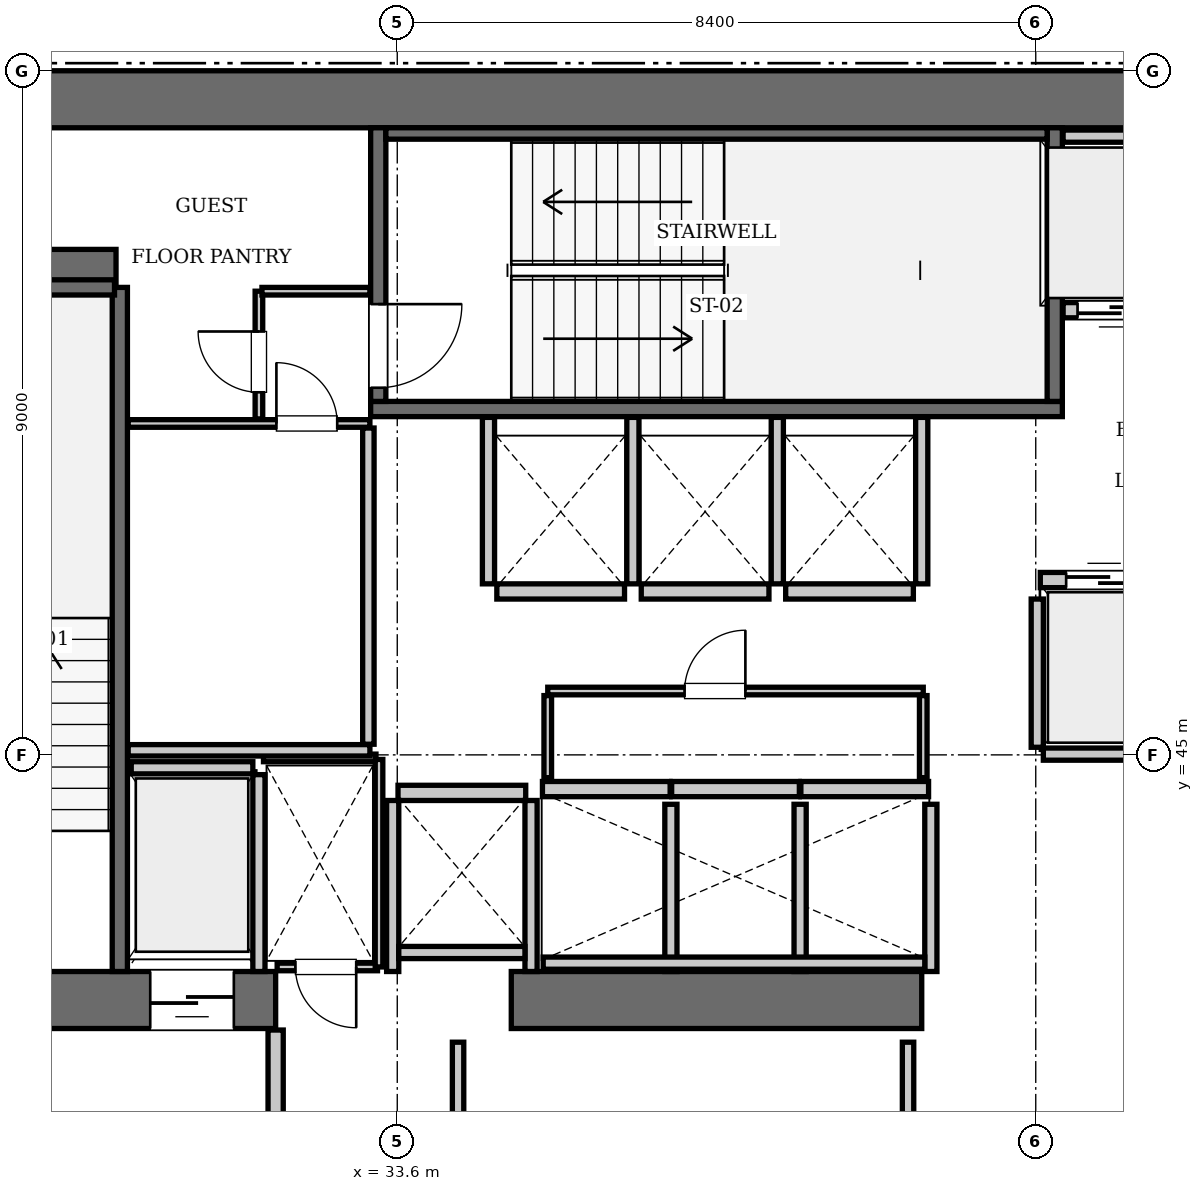
"""IFC4 building model, lengths in metres.
Left out: names, types, materials, properties, quantities, classifications, styles, units other than length and angle.
Written with IfcOpenShell. Run it as: python <this file> out.ifc"""

import sys

from ifc_helpers import new_model, si_unit, direction, frame, frame_2d, origin, place, context, subcontext, project, spatial, rectangle, extrude, element, fill, save


model = new_model("IFC4")
c1 = context("Model", 3, precision=1e-05, world=origin(), true_north=direction((0.0, 1.0)))
c2 = subcontext(c1, "Body", "Model", "MODEL_VIEW")
j1 = project(units=[si_unit("LENGTHUNIT", "METRE"), si_unit("PLANEANGLEUNIT", "RADIAN")], contexts=[c1])
p1 = place(None, origin())
s1 = spatial("IfcSite", under=j1, at=p1, CompositionType="ELEMENT")
p2 = place(p1, origin())
s2 = spatial("IfcBuilding", under=s1, at=p2, CompositionType="ELEMENT")
p3 = place(p2, frame((0.0, 0.0, 162.05)))
s3 = spatial("IfcBuildingStorey", under=s2, at=p3, CompositionType="ELEMENT", Elevation=162.05)
p4 = place(p3, frame((25.2, 53.625, 0.0), z_axis=(0.0, 0.0, 1.0), x_axis=(1.0, 0.0, 0.0)))
e1 = element("IfcWall", 1, at=p4, inside=s3, PredefinedType="SHEAR", context=c2, shape_type="SweptSolid", body=[
    extrude(rectangle(XDim=25.2, YDim=0.75, at=frame_2d((12.6, 0.0))), origin(), (0.0, 0.0, 1.0), 3.85),
])
p5 = place(p3, frame((25.2, 41.775, 0.0), z_axis=(0.0, 0.0, 1.0), x_axis=(1.0, 0.0, 0.0)))
e2 = element("IfcWall", 2, at=p5, inside=s3, PredefinedType="SHEAR", context=c2, shape_type="SweptSolid", body=[
    extrude(rectangle(XDim=6.8, YDim=0.75, at=frame_2d((3.4, 0.0))), origin(), (0.0, 0.0, 1.0), 3.85),
])
p6 = place(p5, frame((1.65, 0.0, 0.0)))
e3 = element("IfcOpeningElement", 3, at=p6, cuts=e2, PredefinedType="OPENING", context=c2, shape_type="SweptSolid", body=[
    extrude(rectangle(XDim=1.15, YDim=2.15, at=frame_2d((0.575, 1.075))), frame((0.0, 0.385, 0.0), z_axis=(0.0, -1.0, 0.0), x_axis=(1.0, 0.0, 0.0)), (0.0, 0.0, 1.0), 0.77),
])
p7 = place(p5, frame((5.15, 0.0, 0.0)))
e4 = element("IfcOpeningElement", 4, at=p7, cuts=e2, PredefinedType="OPENING", context=c2, shape_type="SweptSolid", body=[
    extrude(rectangle(XDim=1.1, YDim=2.2, at=frame_2d((0.55, 1.1))), frame((0.0, 0.385, 0.0), z_axis=(0.0, -1.0, 0.0), x_axis=(1.0, 0.0, 0.0)), (0.0, 0.0, 1.0), 0.77),
])
p8 = place(p3, frame((35.1, 41.775, 0.0), z_axis=(0.0, 0.0, 1.0), x_axis=(1.0, 0.0, 0.0)))
e5 = element("IfcWall", 5, at=p8, inside=s3, PredefinedType="SHEAR", context=c2, shape_type="SweptSolid", body=[
    extrude(rectangle(XDim=5.4, YDim=0.75, at=frame_2d((2.7, 0.0))), origin(), (0.0, 0.0, 1.0), 3.85),
])
p9 = place(p3, frame((25.95, 51.4, 0.0), z_axis=(0.0, 0.0, 1.0), x_axis=(1.0, 0.0, 0.0)))
e6 = element("IfcWall", 6, at=p9, inside=s3, PredefinedType="SHEAR", context=c2, shape_type="SweptSolid", body=[
    extrude(rectangle(XDim=3.95, YDim=0.5, at=frame_2d((1.975, 0.0))), origin(), (0.0, 0.0, 1.0), 3.85),
])
p10 = place(p3, frame((29.95, 42.15, 0.0), z_axis=(0.0, 0.0, 1.0), x_axis=(0.0, 1.0, 0.0)))
e7 = element("IfcWall", 7, at=p10, inside=s3, PredefinedType="SOLIDWALL", context=c2, shape_type="SweptSolid", body=[
    extrude(rectangle(XDim=9.0, YDim=0.2, at=frame_2d((4.5, 0.0))), origin(), (0.0, 0.0, 1.0), 3.61),
])
p11 = place(p3, frame((26.38, 51.15, 0.0), z_axis=(0.0, 0.0, 1.0), x_axis=(1.0, 0.0, 0.0)))
e8 = element("IfcWall", 8, at=p11, inside=s3, PredefinedType="SOLIDWALL", context=c2, shape_type="SweptSolid", body=[
    extrude(rectangle(XDim=3.5, YDim=0.2, at=frame_2d((1.75, 0.0))), origin(), (0.0, 0.0, 1.0), 3.61),
])
p12 = place(p3, frame((33.25, 49.55, 0.0), z_axis=(0.0, 0.0, 1.0), x_axis=(1.0, 0.0, 0.0)))
e9 = element("IfcWall", 9, at=p12, inside=s3, PredefinedType="SOLIDWALL", context=c2, shape_type="SweptSolid", body=[
    extrude(rectangle(XDim=9.1, YDim=0.2, at=frame_2d((4.55, 0.0))), origin(), (0.0, 0.0, 1.0), 3.61),
])
p13 = place(p3, frame((42.25, 49.65, 0.0), z_axis=(0.0, 0.0, 1.0), x_axis=(0.0, 1.0, 0.0)))
e10 = element("IfcWall", 10, at=p13, inside=s3, PredefinedType="SOLIDWALL", context=c2, shape_type="SweptSolid", body=[
    extrude(rectangle(XDim=3.6, YDim=0.2, at=frame_2d((1.8, 0.0))), origin(), (0.0, 0.0, 1.0), 3.61),
])
p14 = place(p3, frame((33.35, 49.65, 0.0), z_axis=(0.0, 0.0, 1.0), x_axis=(0.0, 1.0, 0.0)))
e11 = element("IfcWall", 11, at=p14, inside=s3, PredefinedType="SOLIDWALL", context=c2, shape_type="SweptSolid", body=[
    extrude(rectangle(XDim=3.6, YDim=0.2, at=frame_2d((1.8, 0.0))), origin(), (0.0, 0.0, 1.0), 3.61),
])
p15 = place(p14, frame((0.18, 0.0, 0.0)))
e12 = element("IfcOpeningElement", 12, at=p15, cuts=e11, PredefinedType="OPENING", context=c2, shape_type="SweptSolid", body=[
    extrude(rectangle(XDim=1.1, YDim=2.15, at=frame_2d((0.55, 1.075))), frame((0.0, 0.11, 0.0), z_axis=(0.0, -1.0, 0.0), x_axis=(1.0, 0.0, 0.0)), (0.0, 0.0, 1.0), 0.22),
])
p16 = place(p3, frame((33.45, 53.175, 0.0), z_axis=(0.0, 0.0, 1.0), x_axis=(1.0, 0.0, 0.0)))
e13 = element("IfcWall", 13, at=p16, inside=s3, PredefinedType="SOLIDWALL", context=c2, shape_type="SweptSolid", body=[
    extrude(rectangle(XDim=8.7, YDim=0.15, at=frame_2d((4.35, 0.0))), origin(), (0.0, 0.0, 1.0), 3.61),
])
p17 = place(p3, frame((42.06, 47.3, 0.0), z_axis=(0.0, 0.0, 1.0), x_axis=(1.0, 0.0, 0.0)))
e14 = element("IfcWall", 14, at=p17, inside=s3, PredefinedType="SOLIDWALL", context=c2, shape_type="SweptSolid", body=[
    extrude(rectangle(XDim=1.68, YDim=0.2, at=frame_2d((0.84, 0.0))), origin(), (0.0, 0.0, 1.0), 3.61),
])
p18 = place(p17, frame((0.34, 0.0, 0.0)))
e15 = element("IfcOpeningElement", 15, at=p18, cuts=e14, PredefinedType="OPENING", context=c2, shape_type="SweptSolid", body=[
    extrude(rectangle(XDim=1.0, YDim=2.15, at=frame_2d((0.5, 1.075))), frame((0.0, 0.11, 0.0), z_axis=(0.0, -1.0, 0.0), x_axis=(1.0, 0.0, 0.0)), (0.0, 0.0, 1.0), 0.22),
])
p19 = place(p3, frame((42.36, 50.85, 0.0), z_axis=(0.0, 0.0, 1.0), x_axis=(1.0, 0.0, 0.0)))
e16 = element("IfcWall", 16, at=p19, inside=s3, PredefinedType="SOLIDWALL", context=c2, shape_type="SweptSolid", body=[
    extrude(rectangle(XDim=1.38, YDim=0.2, at=frame_2d((0.69, 0.0))), origin(), (0.0, 0.0, 1.0), 3.61),
])
p20 = place(p19, frame((0.19, 0.0, 0.0)))
e17 = element("IfcOpeningElement", 17, at=p20, cuts=e16, PredefinedType="OPENING", context=c2, shape_type="SweptSolid", body=[
    extrude(rectangle(XDim=1.0, YDim=2.15, at=frame_2d((0.5, 1.075))), frame((0.0, 0.11, 0.0), z_axis=(0.0, -1.0, 0.0), x_axis=(1.0, 0.0, 0.0)), (0.0, 0.0, 1.0), 0.22),
])
for number, where, z_axis, x_axis in (
    (18, (35.51, 44.55, 0.0), (0.0, 0.0, 1.0), (1.0, 0.0, 0.0)),
    (19, (37.21, 44.55, 0.0), (0.0, 0.0, 1.0), (1.0, 0.0, 0.0)),
):
    element("IfcWall", number, at=place(p3, frame(where, z_axis=z_axis, x_axis=x_axis)), inside=s3, PredefinedType="SOLIDWALL", context=c2, shape_type="SweptSolid", body=[
        extrude(rectangle(XDim=1.68, YDim=0.2, at=frame_2d((0.84, 0.0))), origin(), (0.0, 0.0, 1.0), 3.61),
    ])
for number, where, z_axis, x_axis in (
    (20, (38.91, 44.55, 0.0), (0.0, 0.0, 1.0), (1.0, 0.0, 0.0)),
    (21, (34.91, 47.15, 0.0), (0.0, 0.0, 1.0), (1.0, 0.0, 0.0)),
):
    element("IfcWall", number, at=place(p3, frame(where, z_axis=z_axis, x_axis=x_axis)), inside=s3, PredefinedType="SOLIDWALL", context=c2, shape_type="SweptSolid", body=[
        extrude(rectangle(XDim=1.68, YDim=0.2, at=frame_2d((0.84, 0.0))), origin(), (0.0, 0.0, 1.0), 3.61),
    ])
for number, where, z_axis, x_axis in (
    (22, (36.81, 47.15, 0.0), (0.0, 0.0, 1.0), (1.0, 0.0, 0.0)),
    (23, (38.71, 47.15, 0.0), (0.0, 0.0, 1.0), (1.0, 0.0, 0.0)),
    (24, (33.61, 44.5, 0.0), (0.0, 0.0, 1.0), (1.0, 0.0, 0.0)),
):
    element("IfcWall", number, at=place(p3, frame(where, z_axis=z_axis, x_axis=x_axis)), inside=s3, PredefinedType="SOLIDWALL", context=c2, shape_type="SweptSolid", body=[
        extrude(rectangle(XDim=1.68, YDim=0.2, at=frame_2d((0.84, 0.0))), origin(), (0.0, 0.0, 1.0), 3.61),
    ])
p21 = place(p3, frame((30.1, 44.83, 0.0), z_axis=(0.0, 0.0, 1.0), x_axis=(1.0, 0.0, 0.0)))
e25 = element("IfcWall", 25, at=p21, inside=s3, PredefinedType="SOLIDWALL", context=c2, shape_type="SweptSolid", body=[
    extrude(rectangle(XDim=1.6, YDim=0.16, at=frame_2d((0.8, 0.0))), origin(), (0.0, 0.0, 1.0), 3.61),
])
p22 = place(p3, frame((31.78, 42.15, 0.0), z_axis=(0.0, 0.0, 1.0), x_axis=(0.0, 1.0, 0.0)))
e26 = element("IfcWall", 26, at=p22, inside=s3, PredefinedType="SOLIDWALL", context=c2, shape_type="SweptSolid", body=[
    extrude(rectangle(XDim=2.59, YDim=0.16, at=frame_2d((1.295, 0.0))), origin(), (0.0, 0.0, 1.0), 3.61),
])
p23 = place(p3, frame((42.02, 45.1, 0.0), z_axis=(0.0, 0.0, 1.0), x_axis=(0.0, 1.0, 0.0)))
e27 = element("IfcWall", 27, at=p23, inside=s3, PredefinedType="SOLIDWALL", context=c2, shape_type="SweptSolid", body=[
    extrude(rectangle(XDim=1.95, YDim=0.16, at=frame_2d((0.975, 0.0))), origin(), (0.0, 0.0, 1.0), 3.61),
])
p24 = place(p3, frame((42.1, 45.01, 0.0), z_axis=(0.0, 0.0, 1.0), x_axis=(1.0, 0.0, 0.0)))
e28 = element("IfcWall", 28, at=p24, inside=s3, PredefinedType="SOLIDWALL", context=c2, shape_type="SweptSolid", body=[
    extrude(rectangle(XDim=3.45, YDim=0.16, at=frame_2d((1.725, 0.0))), origin(), (0.0, 0.0, 1.0), 3.61),
])
p25 = place(p3, frame((42.36, 53.14, 0.0), z_axis=(0.0, 0.0, 1.0), x_axis=(1.0, 0.0, 0.0)))
e29 = element("IfcWall", 29, at=p25, inside=s3, PredefinedType="SOLIDWALL", context=c2, shape_type="SweptSolid", body=[
    extrude(rectangle(XDim=3.14, YDim=0.16, at=frame_2d((1.57, 0.0))), origin(), (0.0, 0.0, 1.0), 3.61),
])
for number, where, z_axis, x_axis in (
    (30, (37.2, 42.15, 0.0), (0.0, 0.0, 1.0), (0.0, 1.0, 0.0)),
    (31, (38.9, 42.15, 0.0), (0.0, 0.0, 1.0), (0.0, 1.0, 0.0)),
    (32, (40.62, 42.15, 0.0), (0.0, 0.0, 1.0), (0.0, 1.0, 0.0)),
):
    element("IfcWall", number, at=place(p3, frame(where, z_axis=z_axis, x_axis=x_axis)), inside=s3, PredefinedType="SOLIDWALL", context=c2, shape_type="SweptSolid", body=[
        extrude(rectangle(XDim=2.2, YDim=0.16, at=frame_2d((1.1, 0.0))), origin(), (0.0, 0.0, 1.0), 3.61),
    ])
p26 = place(p3, frame((35.52, 42.26, 0.0), z_axis=(0.0, 0.0, 1.0), x_axis=(1.0, 0.0, 0.0)))
e33 = element("IfcWall", 33, at=p26, inside=s3, PredefinedType="SOLIDWALL", context=c2, shape_type="SweptSolid", body=[
    extrude(rectangle(XDim=5.02, YDim=0.16, at=frame_2d((2.51, 0.0))), origin(), (0.0, 0.0, 1.0), 3.61),
])
for number, where, z_axis, x_axis in (
    (34, (34.8, 47.25, 0.0), (0.0, 0.0, 1.0), (0.0, 1.0, 0.0)),
    (35, (36.7, 47.25, 0.0), (0.0, 0.0, 1.0), (0.0, 1.0, 0.0)),
    (36, (38.6, 47.25, 0.0), (0.0, 0.0, 1.0), (0.0, 1.0, 0.0)),
    (37, (40.5, 47.25, 0.0), (0.0, 0.0, 1.0), (0.0, 1.0, 0.0)),
):
    element("IfcWall", number, at=place(p3, frame(where, z_axis=z_axis, x_axis=x_axis)), inside=s3, PredefinedType="SOLIDWALL", context=c2, shape_type="SweptSolid", body=[
        extrude(rectangle(XDim=2.19, YDim=0.16, at=frame_2d((1.095, 0.0))), origin(), (0.0, 0.0, 1.0), 3.61),
    ])
for number, where, z_axis, x_axis in (
    (38, (33.54, 42.15, 0.0), (0.0, 0.0, 1.0), (0.0, 1.0, 0.0)),
    (39, (35.36, 42.15, 0.0), (0.0, 0.0, 1.0), (0.0, 1.0, 0.0)),
):
    element("IfcWall", number, at=place(p3, frame(where, z_axis=z_axis, x_axis=x_axis)), inside=s3, PredefinedType="SOLIDWALL", context=c2, shape_type="SweptSolid", body=[
        extrude(rectangle(XDim=2.25, YDim=0.16, at=frame_2d((1.125, 0.0))), origin(), (0.0, 0.0, 1.0), 3.61),
    ])
p27 = place(p3, frame((33.62, 42.4, 0.0), z_axis=(0.0, 0.0, 1.0), x_axis=(1.0, 0.0, 0.0)))
e40 = element("IfcWall", 40, at=p27, inside=s3, PredefinedType="SOLIDWALL", context=c2, shape_type="SweptSolid", body=[
    extrude(rectangle(XDim=1.66, YDim=0.16, at=frame_2d((0.83, 0.0))), origin(), (0.0, 0.0, 1.0), 3.61),
])
p28 = place(p3, frame((32.0, 38.31, 0.0), z_axis=(0.0, 0.0, 1.0), x_axis=(0.0, 1.0, 0.0)))
e41 = element("IfcWall", 41, at=p28, inside=s3, PredefinedType="PARTITIONING", context=c2, shape_type="SweptSolid", body=[
    extrude(rectangle(XDim=3.07, YDim=0.2, at=frame_2d((1.535, 0.0))), origin(), (0.0, 0.0, 1.0), 3.61),
])
p29 = place(p3, frame((32.02, 42.21, 0.0), z_axis=(0.0, 0.0, 1.0), x_axis=(1.0, 0.0, 0.0)))
e42 = element("IfcWall", 42, at=p29, inside=s3, PredefinedType="PARTITIONING", context=c2, shape_type="SweptSolid", body=[
    extrude(rectangle(XDim=1.32, YDim=0.1, at=frame_2d((0.66, 0.0))), origin(), (0.0, 0.0, 1.0), 3.61),
])
p30 = place(p29, frame((0.24, 0.0, 0.0)))
e43 = element("IfcOpeningElement", 43, at=p30, cuts=e42, PredefinedType="OPENING", context=c2, shape_type="SweptSolid", body=[
    extrude(rectangle(XDim=0.8, YDim=2.05, at=frame_2d((0.4, 1.025))), frame((0.0, 0.06, 0.0), z_axis=(0.0, -1.0, 0.0), x_axis=(1.0, 0.0, 0.0)), (0.0, 0.0, 1.0), 0.12),
])
p31 = place(p3, frame((31.84, 44.96, 0.0), z_axis=(0.0, 0.0, 1.0), x_axis=(1.0, 0.0, 0.0)))
e44 = element("IfcWall", 44, at=p31, inside=s3, PredefinedType="PARTITIONING", context=c2, shape_type="SweptSolid", body=[
    extrude(rectangle(XDim=1.48, YDim=0.1, at=frame_2d((0.74, 0.0))), origin(), (0.0, 0.0, 1.0), 3.61),
])
p32 = place(p3, frame((33.36, 42.21, 0.0), z_axis=(0.0, 0.0, 1.0), x_axis=(0.0, 1.0, 0.0)))
e45 = element("IfcWall", 45, at=p32, inside=s3, PredefinedType="PARTITIONING", context=c2, shape_type="SweptSolid", body=[
    extrude(rectangle(XDim=2.73, YDim=0.1, at=frame_2d((1.365, 0.0))), origin(), (0.0, 0.0, 1.0), 3.61),
])
p33 = place(p3, frame((35.58, 45.84, 0.0), z_axis=(0.0, 0.0, 1.0), x_axis=(1.0, 0.0, 0.0)))
e46 = element("IfcWall", 46, at=p33, inside=s3, PredefinedType="PARTITIONING", context=c2, shape_type="SweptSolid", body=[
    extrude(rectangle(XDim=4.94, YDim=0.1, at=frame_2d((2.47, 0.0))), origin(), (0.0, 0.0, 1.0), 3.61),
])
p34 = place(p33, frame((1.8, 0.0, 0.0)))
e47 = element("IfcOpeningElement", 47, at=p34, cuts=e46, PredefinedType="OPENING", context=c2, shape_type="SweptSolid", body=[
    extrude(rectangle(XDim=0.8, YDim=2.05, at=frame_2d((0.4, 1.025))), frame((0.0, 0.06, 0.0), z_axis=(0.0, -1.0, 0.0), x_axis=(1.0, 0.0, 0.0)), (0.0, 0.0, 1.0), 0.12),
])
for number, where, z_axis, x_axis in (
    (48, (35.58, 44.7, 0.0), (0.0, 0.0, 1.0), (0.0, 1.0, 0.0)),
    (49, (40.52, 44.7, 0.0), (0.0, 0.0, 1.0), (0.0, 1.0, 0.0)),
):
    element("IfcWall", number, at=place(p3, frame(where, z_axis=z_axis, x_axis=x_axis)), inside=s3, PredefinedType="PARTITIONING", context=c2, shape_type="SweptSolid", body=[
        extrude(rectangle(XDim=1.08, YDim=0.1, at=frame_2d((0.54, 0.0))), origin(), (0.0, 0.0, 1.0), 3.61),
    ])
p35 = place(p3, frame((30.06, 45.06, 0.0), z_axis=(0.0, 0.0, 1.0), x_axis=(1.0, 0.0, 0.0)))
e50 = element("IfcWall", 50, at=p35, inside=s3, PredefinedType="PARTITIONING", context=c2, shape_type="SweptSolid", body=[
    extrude(rectangle(XDim=3.18, YDim=0.15, at=frame_2d((1.59, 0.0))), origin(), (0.0, 0.0, 1.0), 3.61),
])
p36 = place(p3, frame((33.22, 45.14, 0.0), z_axis=(0.0, 0.0, 1.0), x_axis=(0.0, 1.0, 0.0)))
e51 = element("IfcWall", 51, at=p36, inside=s3, PredefinedType="PARTITIONING", context=c2, shape_type="SweptSolid", body=[
    extrude(rectangle(XDim=4.16, YDim=0.15, at=frame_2d((2.08, 0.0))), origin(), (0.0, 0.0, 1.0), 3.61),
])
p37 = place(p3, frame((30.06, 49.36, 0.0), z_axis=(0.0, 0.0, 1.0), x_axis=(1.0, 0.0, 0.0)))
e52 = element("IfcWall", 52, at=p37, inside=s3, PredefinedType="PARTITIONING", context=c2, shape_type="SweptSolid", body=[
    extrude(rectangle(XDim=3.18, YDim=0.1, at=frame_2d((1.59, 0.0))), origin(), (0.0, 0.0, 1.0), 3.61),
])
p38 = place(p37, frame((1.95, 0.0, 0.0)))
e53 = element("IfcOpeningElement", 53, at=p38, cuts=e52, PredefinedType="OPENING", context=c2, shape_type="SweptSolid", body=[
    extrude(rectangle(XDim=0.8, YDim=2.05, at=frame_2d((0.4, 1.025))), frame((0.0, 0.06, 0.0), z_axis=(0.0, -1.0, 0.0), x_axis=(1.0, 0.0, 0.0)), (0.0, 0.0, 1.0), 0.12),
])
p39 = place(p3, frame((31.78, 49.42, 0.0), z_axis=(0.0, 0.0, 1.0), x_axis=(0.0, 1.0, 0.0)))
e54 = element("IfcWall", 54, at=p39, inside=s3, PredefinedType="PARTITIONING", context=c2, shape_type="SweptSolid", body=[
    extrude(rectangle(XDim=1.68, YDim=0.1, at=frame_2d((0.84, 0.0))), origin(), (0.0, 0.0, 1.0), 3.61),
])
p40 = place(p39, frame((0.35, 0.0, 0.0)))
e55 = element("IfcOpeningElement", 55, at=p40, cuts=e54, PredefinedType="OPENING", context=c2, shape_type="SweptSolid", body=[
    extrude(rectangle(XDim=0.8, YDim=2.05, at=frame_2d((0.4, 1.025))), frame((0.0, 0.06, 0.0), z_axis=(0.0, -1.0, 0.0), x_axis=(1.0, 0.0, 0.0)), (0.0, 0.0, 1.0), 0.12),
])
p41 = place(p3, frame((31.82, 51.1, 0.0), z_axis=(0.0, 0.0, 1.0), x_axis=(1.0, 0.0, 0.0)))
e56 = element("IfcWall", 56, at=p41, inside=s3, PredefinedType="PARTITIONING", context=c2, shape_type="SweptSolid", body=[
    extrude(rectangle(XDim=1.42, YDim=0.1, at=frame_2d((0.71, 0.0))), origin(), (0.0, 0.0, 1.0), 3.61),
])
for number, where, z_axis, x_axis in (
    (57, (34.4, 38.38, 0.0), (0.0, 0.0, 1.0), (0.0, 1.0, 0.0)),
    (58, (40.32, 38.38, 0.0), (0.0, 0.0, 1.0), (0.0, 1.0, 0.0)),
):
    element("IfcWall", number, at=place(p3, frame(where, z_axis=z_axis, x_axis=x_axis)), inside=s3, PredefinedType="PARTITIONING", context=c2, shape_type="SweptSolid", body=[
        extrude(rectangle(XDim=2.84, YDim=0.15, at=frame_2d((1.42, 0.0))), origin(), (0.0, 0.0, 1.0), 3.61),
    ])
p42 = place(p15, frame((1.1, 0.0, 0.0), z_axis=(0.0, 0.0, 1.0), x_axis=(-1.0, 0.0, 0.0)))
e59 = element("IfcDoor", 59, at=p42, inside=s3, OperationType="SINGLE_SWING_LEFT", PredefinedType="DOOR", context=c2, shape_type="SweptSolid", body=[
    extrude(rectangle(XDim=1.1, YDim=2.15, at=frame_2d((0.55, 1.075))), frame((0.0, 0.025, 0.0), z_axis=(0.0, -1.0, 0.0), x_axis=(1.0, 0.0, 0.0)), (0.0, 0.0, 1.0), 0.05),
])
fill(e12, e59)
p43 = place(p18, origin())
e60 = element("IfcDoor", 60, at=p43, inside=s3, OperationType="SLIDING_TO_LEFT", PredefinedType="DOOR", context=c2, shape_type="SweptSolid", body=[
    extrude(rectangle(XDim=1.0, YDim=2.15, at=frame_2d((0.5, 1.075))), frame((0.0, 0.025, 0.0), z_axis=(0.0, -1.0, 0.0), x_axis=(1.0, 0.0, 0.0)), (0.0, 0.0, 1.0), 0.05),
])
fill(e15, e60)
p44 = place(p20, frame((1.0, 0.0, 0.0), z_axis=(0.0, 0.0, 1.0), x_axis=(-1.0, 0.0, 0.0)))
e61 = element("IfcDoor", 61, at=p44, inside=s3, OperationType="SLIDING_TO_LEFT", PredefinedType="DOOR", context=c2, shape_type="SweptSolid", body=[
    extrude(rectangle(XDim=1.0, YDim=2.15, at=frame_2d((0.5, 1.075))), frame((0.0, 0.025, 0.0), z_axis=(0.0, -1.0, 0.0), x_axis=(1.0, 0.0, 0.0)), (0.0, 0.0, 1.0), 0.05),
])
fill(e17, e61)
p45 = place(p7, frame((1.1, 0.0, 0.0), z_axis=(0.0, 0.0, 1.0), x_axis=(-1.0, 0.0, 0.0)))
e62 = element("IfcDoor", 62, at=p45, inside=s3, OperationType="SLIDING_TO_LEFT", PredefinedType="DOOR", context=c2, shape_type="SweptSolid", body=[
    extrude(rectangle(XDim=1.1, YDim=2.2, at=frame_2d((0.55, 1.1))), frame((0.0, 0.025, 0.0), z_axis=(0.0, -1.0, 0.0), x_axis=(1.0, 0.0, 0.0)), (0.0, 0.0, 1.0), 0.05),
])
fill(e4, e62)
p46 = place(p30, frame((0.8, 0.0, 0.0), z_axis=(0.0, 0.0, 1.0), x_axis=(-1.0, 0.0, 0.0)))
e63 = element("IfcDoor", 63, at=p46, inside=s3, OperationType="SINGLE_SWING_LEFT", PredefinedType="DOOR", context=c2, shape_type="SweptSolid", body=[
    extrude(rectangle(XDim=0.8, YDim=2.05, at=frame_2d((0.4, 1.025))), frame((0.0, 0.025, 0.0), z_axis=(0.0, -1.0, 0.0), x_axis=(1.0, 0.0, 0.0)), (0.0, 0.0, 1.0), 0.05),
])
fill(e43, e63)
p47 = place(p34, origin())
e64 = element("IfcDoor", 64, at=p47, inside=s3, OperationType="SINGLE_SWING_RIGHT", PredefinedType="DOOR", context=c2, shape_type="SweptSolid", body=[
    extrude(rectangle(XDim=0.8, YDim=2.05, at=frame_2d((0.4, 1.025))), frame((0.0, 0.025, 0.0), z_axis=(0.0, -1.0, 0.0), x_axis=(1.0, 0.0, 0.0)), (0.0, 0.0, 1.0), 0.05),
])
fill(e47, e64)
p48 = place(p38, origin())
e65 = element("IfcDoor", 65, at=p48, inside=s3, OperationType="SINGLE_SWING_LEFT", PredefinedType="DOOR", context=c2, shape_type="SweptSolid", body=[
    extrude(rectangle(XDim=0.8, YDim=2.05, at=frame_2d((0.4, 1.025))), frame((0.0, 0.025, 0.0), z_axis=(0.0, -1.0, 0.0), x_axis=(1.0, 0.0, 0.0)), (0.0, 0.0, 1.0), 0.05),
])
fill(e53, e65)
p49 = place(p40, origin())
e66 = element("IfcDoor", 66, at=p49, inside=s3, OperationType="SINGLE_SWING_RIGHT", PredefinedType="DOOR", context=c2, shape_type="SweptSolid", body=[
    extrude(rectangle(XDim=0.8, YDim=2.05, at=frame_2d((0.4, 1.025))), frame((0.0, 0.025, 0.0), z_axis=(0.0, -1.0, 0.0), x_axis=(1.0, 0.0, 0.0)), (0.0, 0.0, 1.0), 0.05),
])
fill(e55, e66)
save(model, sys.argv[1])
